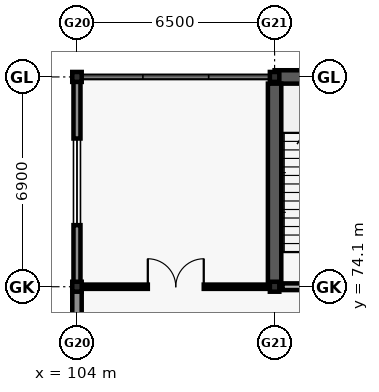
"""IFC4 building model, lengths in metres.
Left out: names, types, materials, properties, quantities, classifications, styles, units other than length and angle.
Written with IfcOpenShell. Run it as: python <this file> out.ifc"""

import sys

from ifc_helpers import new_model, si_unit, direction, frame, frame_2d, origin, origin_2d, place, context, subcontext, project, spatial, rectangle, i_section, extrude, element, fill, save


model = new_model("IFC4")
c1 = context("Model", 3, precision=1e-05, world=origin(), true_north=direction((0.0, 1.0)))
c2 = subcontext(c1, "Body", "Model", "MODEL_VIEW")
j1 = project(units=[si_unit("LENGTHUNIT", "METRE"), si_unit("PLANEANGLEUNIT", "RADIAN")], contexts=[c1])
p1 = place(None, origin())
s1 = spatial("IfcSite", under=j1, at=p1, CompositionType="ELEMENT")
p2 = place(p1, origin())
s2 = spatial("IfcBuilding", under=s1, at=p2, CompositionType="ELEMENT")
p3 = place(p2, origin())
s3 = spatial("IfcBuildingStorey", under=s2, at=p3, CompositionType="ELEMENT", Elevation=0.0)
for number, where, z_axis, x_axis in (
    (1, (104.0, 74.1, 0.0), (0.0, 0.0, 1.0), (1.0, 0.0, 0.0)),
    (2, (104.0, 81.0, 0.0), (0.0, 0.0, 1.0), (1.0, 0.0, 0.0)),
    (3, (110.5, 74.1, 0.0), (0.0, 0.0, 1.0), (1.0, 0.0, 0.0)),
    (4, (110.5, 81.0, 0.0), (0.0, 0.0, 1.0), (1.0, 0.0, 0.0)),
):
    element("IfcColumn", number, at=place(p3, frame(where, z_axis=z_axis, x_axis=x_axis)), inside=s3, PredefinedType="COLUMN", context=c2, shape_type="SweptSolid", body=[
        extrude(i_section(OverallWidth=0.311, OverallDepth=0.327, WebThickness=0.016, FlangeThickness=0.025, FilletRadius=0.017, at=origin_2d()), origin(), (0.0, 0.0, 1.0), 5.4),
    ])
p4 = place(p3, frame((110.5, 81.0, 0.0), z_axis=(0.0, 0.0, 1.0), x_axis=(1.0, 0.0, 0.0)))
e5 = element("IfcWall", 5, at=p4, inside=s3, PredefinedType="SHEAR", context=c2, shape_type="SweptSolid", body=[
    extrude(rectangle(XDim=6.5, YDim=0.44, at=frame_2d((3.25, 0.0))), origin(), (0.0, 0.0, 1.0), 5.16),
])
p5 = place(p3, frame((110.5, 74.1, 0.0), z_axis=(0.0, 0.0, 1.0), x_axis=(0.0, 1.0, 0.0)))
e6 = element("IfcWall", 6, at=p5, inside=s3, PredefinedType="SHEAR", context=c2, shape_type="SweptSolid", body=[
    extrude(rectangle(XDim=6.68, YDim=0.44, at=frame_2d((3.34, 0.0))), origin(), (0.0, 0.0, 1.0), 5.16),
])
p6 = place(p3, frame((104.0, 67.205, 0.0), z_axis=(0.0, 0.0, 1.0), x_axis=(0.0, 1.0, 0.0)))
e7 = element("IfcWall", 7, at=p6, inside=s3, PredefinedType="SOLIDWALL", context=c2, shape_type="SweptSolid", body=[
    extrude(rectangle(XDim=6.89, YDim=0.31, at=frame_2d((3.445, 0.0))), origin(), (0.0, 0.0, 1.0), 4.52),
])
p7 = place(p6, frame((0.887, 0.0, 0.8)))
e8 = element("IfcOpeningElement", 8, at=p7, cuts=e7, PredefinedType="OPENING", context=c2, shape_type="SweptSolid", body=[
    extrude(rectangle(XDim=2.55, YDim=2.1, at=frame_2d((1.275, 1.05))), frame((0.0, 0.165, 0.0), z_axis=(0.0, -1.0, 0.0), x_axis=(1.0, 0.0, 0.0)), (0.0, 0.0, 1.0), 0.33),
])
p8 = place(p3, frame((104.0, 74.105, 0.0), z_axis=(0.0, 0.0, 1.0), x_axis=(0.0, 1.0, 0.0)))
e9 = element("IfcWall", 9, at=p8, inside=s3, PredefinedType="SOLIDWALL", context=c2, shape_type="SweptSolid", body=[
    extrude(rectangle(XDim=6.89, YDim=0.23, at=frame_2d((3.445, 0.0))), origin(), (0.0, 0.0, 1.0), 4.52),
])
p9 = place(p8, frame((2.02, 0.0, 0.8)))
e10 = element("IfcOpeningElement", 10, at=p9, cuts=e9, PredefinedType="OPENING", context=c2, shape_type="SweptSolid", body=[
    extrude(rectangle(XDim=2.85, YDim=2.1, at=frame_2d((1.425, 1.05))), frame((0.0, 0.125, 0.0), z_axis=(0.0, -1.0, 0.0), x_axis=(1.0, 0.0, 0.0)), (0.0, 0.0, 1.0), 0.25),
])
p10 = place(p3, frame((110.76, 74.1, 0.0), z_axis=(0.0, 0.0, 1.0), x_axis=(1.0, 0.0, 0.0)))
e11 = element("IfcWall", 11, at=p10, inside=s3, PredefinedType="SOLIDWALL", context=c2, shape_type="SweptSolid", body=[
    extrude(rectangle(XDim=2.74, YDim=0.22, at=frame_2d((1.37, 0.0))), origin(), (0.0, 0.0, 1.0), 4.52),
])
p11 = place(p10, frame((1.44, 0.0, 0.0)))
e12 = element("IfcOpeningElement", 12, at=p11, cuts=e11, PredefinedType="OPENING", context=c2, shape_type="SweptSolid", body=[
    extrude(rectangle(XDim=1.06, YDim=2.1, at=frame_2d((0.53, 1.05))), frame((0.0, 0.12, 0.0), z_axis=(0.0, -1.0, 0.0), x_axis=(1.0, 0.0, 0.0)), (0.0, 0.0, 1.0), 0.24),
])
p12 = place(p3, frame((104.22, 74.1, 0.0), z_axis=(0.0, 0.0, 1.0), x_axis=(1.0, 0.0, 0.0)))
e13 = element("IfcWall", 13, at=p12, inside=s3, PredefinedType="PARTITIONING", context=c2, shape_type="SweptSolid", body=[
    extrude(rectangle(XDim=6.06, YDim=0.14, at=frame_2d((3.03, 0.0))), origin(), (0.0, 0.0, 1.0), 4.5),
])
p13 = place(p12, frame((2.11, 0.0, 0.0)))
e14 = element("IfcOpeningElement", 14, at=p13, cuts=e13, PredefinedType="OPENING", context=c2, shape_type="SweptSolid", body=[
    extrude(rectangle(XDim=1.84, YDim=2.22, at=frame_2d((0.92, 1.11))), frame((0.0, 0.08, 0.0), z_axis=(0.0, -1.0, 0.0), x_axis=(1.0, 0.0, 0.0)), (0.0, 0.0, 1.0), 0.16),
])
p14 = place(p9, origin())
e15 = element("IfcWindow", 15, at=p14, inside=s3, PartitioningType="TRIPLE_PANEL_VERTICAL", PredefinedType="WINDOW", context=c2, shape_type="SweptSolid", body=[
    extrude(rectangle(XDim=2.85, YDim=2.1, at=frame_2d((1.425, 1.05))), frame((0.0, 0.03, 0.0), z_axis=(0.0, -1.0, 0.0), x_axis=(1.0, 0.0, 0.0)), (0.0, 0.0, 1.0), 0.06),
])
fill(e10, e15)
p15 = place(p13, origin())
e16 = element("IfcDoor", 16, at=p15, inside=s3, OperationType="DOUBLE_DOOR_SINGLE_SWING", PredefinedType="DOOR", context=c2, shape_type="SweptSolid", body=[
    extrude(rectangle(XDim=1.84, YDim=2.22, at=frame_2d((0.92, 1.11))), frame((0.0, 0.025, 0.0), z_axis=(0.0, -1.0, 0.0), x_axis=(1.0, 0.0, 0.0)), (0.0, 0.0, 1.0), 0.05),
])
fill(e14, e16)
save(model, sys.argv[1])
